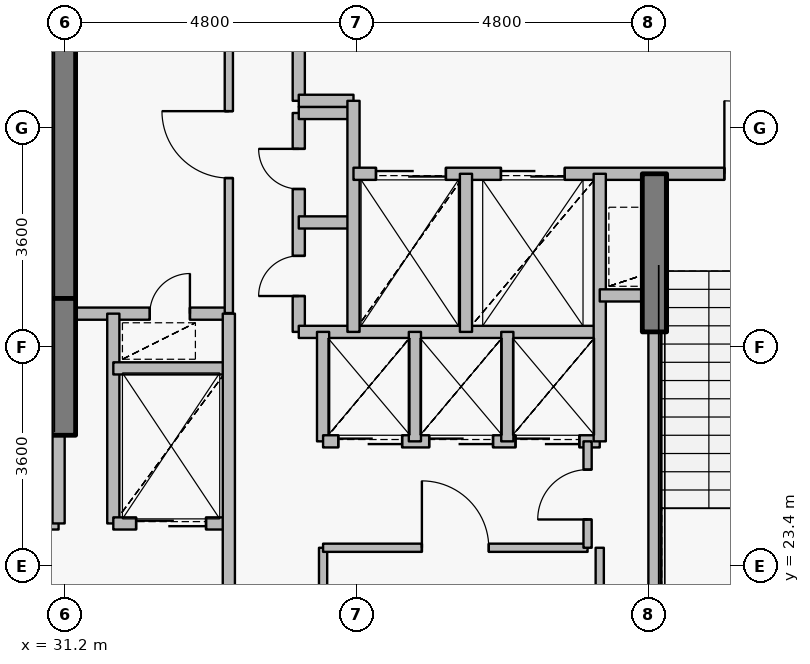
"""IFC4 building model, lengths in metres.
Left out: names, types, materials, properties, quantities, classifications, styles, units other than length and angle.
Written with IfcOpenShell. Run it as: python <this file> out.ifc"""

import sys

from ifc_helpers import new_model, si_unit, direction, frame, frame_2d, origin, origin_2d, place, context, subcontext, project, spatial, rectangle, extrude, source, transform, mapped, element, fill, save


model = new_model("IFC4")
c1 = context("Model", 3, precision=1e-05, world=origin(), true_north=direction((0.0, 1.0)))
c2 = subcontext(c1, "Body", "Model", "MODEL_VIEW")
j1 = project(units=[si_unit("LENGTHUNIT", "METRE"), si_unit("PLANEANGLEUNIT", "RADIAN")], contexts=[c1])
p1 = place(None, origin())
s1 = spatial("IfcSite", under=j1, at=p1, CompositionType="ELEMENT")
p2 = place(p1, origin())
s2 = spatial("IfcBuilding", under=s1, at=p2, CompositionType="ELEMENT")
p3 = place(p2, frame((0.0, 0.0, 359.4)))
s3 = spatial("IfcBuildingStorey", under=s2, at=p3, CompositionType="ELEMENT", Elevation=359.4)
p4 = place(p3, frame((31.18, 27.8, 0.0), z_axis=(0.0, 0.0, 1.0), x_axis=(0.0, 1.0, 0.0)))
e1 = element("IfcWall", 1, at=p4, inside=s3, PredefinedType="SHEAR", context=c2, shape_type="SweptSolid", body=[
    extrude(rectangle(XDim=4.75, YDim=0.4, at=frame_2d((2.375, 0.0))), origin(), (0.0, 0.0, 1.0), 4.2),
])
p5 = place(p3, frame((31.18, 25.55, 0.0), z_axis=(0.0, 0.0, 1.0), x_axis=(0.0, 1.0, 0.0)))
e2 = element("IfcWall", 2, at=p5, inside=s3, PredefinedType="SHEAR", context=c2, shape_type="SweptSolid", body=[
    extrude(rectangle(XDim=2.25, YDim=0.4, at=frame_2d((1.125, 0.0))), origin(), (0.0, 0.0, 1.0), 3.5),
])
p6 = place(p3, frame((40.9, 27.25, 0.0), z_axis=(0.0, 0.0, 1.0), x_axis=(0.0, 1.0, 0.0)))
e3 = element("IfcWall", 3, at=p6, inside=s3, PredefinedType="SHEAR", context=c2, shape_type="SweptSolid", body=[
    extrude(rectangle(XDim=2.6, YDim=0.4, at=frame_2d((1.3, 0.0))), origin(), (0.0, 0.0, 1.0), 3.5),
])
p7 = place(p3, frame((27.56, 24.1, 0.0), z_axis=(0.0, 0.0, 1.0), x_axis=(1.0, 0.0, 0.0)))
e4 = element("IfcWall", 4, at=p7, inside=s3, PredefinedType="PARTITIONING", context=c2, shape_type="SweptSolid", body=[
    extrude(rectangle(XDim=3.54, YDim=0.2, at=frame_2d((1.77, 0.0))), origin(), (0.0, 0.0, 1.0), 3.9),
])
p8 = place(p7, frame((1.17, 0.0, 0.0)))
e5 = element("IfcOpeningElement", 5, at=p8, cuts=e4, PredefinedType="OPENING", context=c2, shape_type="SweptSolid", body=[
    extrude(rectangle(XDim=1.2, YDim=2.15, at=origin_2d()), frame((0.6, 0.11, 1.075), z_axis=(0.0, -1.0, 0.0), x_axis=(1.0, 0.0, 0.0)), (0.0, 0.0, 1.0), 0.22),
])
p9 = place(p3, frame((31.1, 24.1, 0.0), z_axis=(0.0, 0.0, 1.0), x_axis=(0.0, 1.0, 0.0)))
e6 = element("IfcWall", 6, at=p9, inside=s3, PredefinedType="PARTITIONING", context=c2, shape_type="SweptSolid", body=[
    extrude(rectangle(XDim=1.44, YDim=0.2, at=frame_2d((0.72, 0.0))), origin(), (0.0, 0.0, 1.0), 3.9),
])
p10 = place(p3, frame((31.1, 27.55, 0.0), z_axis=(0.0, 0.0, 1.0), x_axis=(1.0, 0.0, 0.0)))
e7 = element("IfcWall", 7, at=p10, inside=s3, PredefinedType="PARTITIONING", context=c2, shape_type="SweptSolid", body=[
    extrude(rectangle(XDim=2.8, YDim=0.2, at=frame_2d((1.4, 0.0))), origin(), (0.0, 0.0, 1.0), 3.485),
])
p11 = place(p10, frame((1.5, 0.0, 0.0)))
e8 = element("IfcOpeningElement", 8, at=p11, cuts=e7, PredefinedType="OPENING", context=c2, shape_type="SweptSolid", body=[
    extrude(rectangle(XDim=0.66, YDim=2.05, at=origin_2d()), frame((0.33, 0.11, 1.025), z_axis=(0.0, -1.0, 0.0), x_axis=(1.0, 0.0, 0.0)), (0.0, 0.0, 1.0), 0.22),
])
p12 = place(p3, frame((32.0, 24.1, 0.0), z_axis=(0.0, 0.0, 1.0), x_axis=(0.0, 1.0, 0.0)))
e9 = element("IfcWall", 9, at=p12, inside=s3, PredefinedType="PARTITIONING", context=c2, shape_type="SweptSolid", body=[
    extrude(rectangle(XDim=3.45, YDim=0.2, at=frame_2d((1.725, 0.0))), origin(), (0.0, 0.0, 1.0), 3.9),
])
p13 = place(p3, frame((32.0, 24.1, 0.0), z_axis=(0.0, 0.0, 1.0), x_axis=(1.0, 0.0, 0.0)))
e10 = element("IfcWall", 10, at=p13, inside=s3, PredefinedType="PARTITIONING", context=c2, shape_type="SweptSolid", body=[
    extrude(rectangle(XDim=1.9, YDim=0.2, at=frame_2d((0.95, 0.0))), origin(), (0.0, 0.0, 1.0), 3.485),
])
p14 = place(p13, frame((0.375, 0.0, 0.0)))
e11 = element("IfcOpeningElement", 11, at=p14, cuts=e10, PredefinedType="OPENING", context=c2, shape_type="SweptSolid", body=[
    extrude(rectangle(XDim=1.15, YDim=2.15, at=origin_2d()), frame((0.575, 0.11, 1.075), z_axis=(0.0, -1.0, 0.0), x_axis=(1.0, 0.0, 0.0)), (0.0, 0.0, 1.0), 0.22),
])
p15 = place(p3, frame((32.0, 26.65, 0.0), z_axis=(0.0, 0.0, 1.0), x_axis=(1.0, 0.0, 0.0)))
e12 = element("IfcWall", 12, at=p15, inside=s3, PredefinedType="PARTITIONING", context=c2, shape_type="SweptSolid", body=[
    extrude(rectangle(XDim=1.9, YDim=0.2, at=frame_2d((0.95, 0.0))), origin(), (0.0, 0.0, 1.0), 3.485),
])
p16 = place(p3, frame((33.9, 20.9, 0.0), z_axis=(0.0, 0.0, 1.0), x_axis=(0.0, 1.0, 0.0)))
e13 = element("IfcWall", 13, at=p16, inside=s3, PredefinedType="PARTITIONING", context=c2, shape_type="SweptSolid", body=[
    extrude(rectangle(XDim=6.65, YDim=0.2, at=frame_2d((3.325, 0.0))), origin(), (0.0, 0.0, 1.0), 3.485),
])
p17 = place(p3, frame((33.9, 27.56, 0.0), z_axis=(0.0, 0.0, 1.0), x_axis=(0.0, 1.0, 0.0)))
e14 = element("IfcWall", 14, at=p17, inside=s3, PredefinedType="PARTITIONING", context=c2, shape_type="SweptSolid", body=[
    extrude(rectangle(XDim=5.54, YDim=0.135, at=frame_2d((2.77, 0.0))), origin(), (0.0, 0.0, 1.0), 3.485),
])
p18 = place(p17, frame((2.22, 0.0, 0.0)))
e15 = element("IfcOpeningElement", 15, at=p18, cuts=e14, PredefinedType="OPENING", context=c2, shape_type="SweptSolid", body=[
    extrude(rectangle(XDim=1.1, YDim=2.15, at=origin_2d()), frame((0.55, 0.078, 1.075), z_axis=(0.0, -1.0, 0.0), x_axis=(1.0, 0.0, 0.0)), (0.0, 0.0, 1.0), 0.155),
])
p19 = place(p3, frame((35.05, 27.25, 0.0), z_axis=(0.0, 0.0, 1.0), x_axis=(0.0, 1.0, 0.0)))
e16 = element("IfcWall", 16, at=p19, inside=s3, PredefinedType="PARTITIONING", context=c2, shape_type="SweptSolid", body=[
    extrude(rectangle(XDim=3.6, YDim=0.2, at=frame_2d((1.8, 0.0))), origin(), (0.0, 0.0, 1.0), 3.9),
])
p20 = place(p19, frame((0.59, 0.0, 0.0)))
e17 = element("IfcOpeningElement", 17, at=p20, cuts=e16, PredefinedType="OPENING", context=c2, shape_type="SweptSolid", body=[
    extrude(rectangle(XDim=0.66, YDim=2.05, at=origin_2d()), frame((0.33, 0.11, 1.025), z_axis=(0.0, -1.0, 0.0), x_axis=(1.0, 0.0, 0.0)), (0.0, 0.0, 1.0), 0.22),
])
p21 = place(p19, frame((2.35, 0.0, 0.0)))
e18 = element("IfcOpeningElement", 18, at=p21, cuts=e16, PredefinedType="OPENING", context=c2, shape_type="SweptSolid", body=[
    extrude(rectangle(XDim=0.66, YDim=2.05, at=origin_2d()), frame((0.33, 0.11, 1.025), z_axis=(0.0, -1.0, 0.0), x_axis=(1.0, 0.0, 0.0)), (0.0, 0.0, 1.0), 0.22),
])
p22 = place(p3, frame((35.05, 27.25, 0.0), z_axis=(0.0, 0.0, 1.0), x_axis=(1.0, 0.0, 0.0)))
e19 = element("IfcWall", 19, at=p22, inside=s3, PredefinedType="PARTITIONING", context=c2, shape_type="SweptSolid", body=[
    extrude(rectangle(XDim=4.95, YDim=0.2, at=frame_2d((2.475, 0.0))), origin(), (0.0, 0.0, 1.0), 3.485),
])
for number, where, z_axis, x_axis in (
    (20, (35.05, 29.05, 0.0), (0.0, 0.0, 1.0), (1.0, 0.0, 0.0)),
    (21, (35.05, 30.85, 0.0), (0.0, 0.0, 1.0), (1.0, 0.0, 0.0)),
):
    element("IfcWall", number, at=place(p3, frame(where, z_axis=z_axis, x_axis=x_axis)), inside=s3, PredefinedType="PARTITIONING", context=c2, shape_type="SweptSolid", body=[
        extrude(rectangle(XDim=0.9, YDim=0.2, at=frame_2d((0.45, 0.0))), origin(), (0.0, 0.0, 1.0), 3.9),
    ])
p23 = place(p3, frame((35.05, 31.05, 0.0), z_axis=(0.0, 0.0, 1.0), x_axis=(0.0, 1.0, 0.0)))
e22 = element("IfcWall", 22, at=p23, inside=s3, PredefinedType="PARTITIONING", context=c2, shape_type="SweptSolid", body=[
    extrude(rectangle(XDim=2.05, YDim=0.2, at=frame_2d((1.025, 0.0))), origin(), (0.0, 0.0, 1.0), 3.485),
])
p24 = place(p3, frame((35.05, 31.05, 0.0), z_axis=(0.0, 0.0, 1.0), x_axis=(1.0, 0.0, 0.0)))
e23 = element("IfcWall", 23, at=p24, inside=s3, PredefinedType="PARTITIONING", context=c2, shape_type="SweptSolid", body=[
    extrude(rectangle(XDim=0.9, YDim=0.2, at=frame_2d((0.45, 0.0))), origin(), (0.0, 0.0, 1.0), 3.9),
])
p25 = place(p3, frame((35.45, 20.9, 0.0), z_axis=(0.0, 0.0, 1.0), x_axis=(0.0, 1.0, 0.0)))
e24 = element("IfcWall", 24, at=p25, inside=s3, PredefinedType="PARTITIONING", context=c2, shape_type="SweptSolid", body=[
    extrude(rectangle(XDim=2.8, YDim=0.135, at=frame_2d((1.4, 0.0))), origin(), (0.0, 0.0, 1.0), 3.485),
])
p26 = place(p3, frame((35.45, 23.7, 0.0), z_axis=(0.0, 0.0, 1.0), x_axis=(1.0, 0.0, 0.0)))
e25 = element("IfcWall", 25, at=p26, inside=s3, PredefinedType="PARTITIONING", context=c2, shape_type="SweptSolid", body=[
    extrude(rectangle(XDim=4.35, YDim=0.135, at=frame_2d((2.175, 0.0))), origin(), (0.0, 0.0, 1.0), 3.485),
])
p27 = place(p26, frame((1.625, 0.0, 0.0)))
e26 = element("IfcOpeningElement", 26, at=p27, cuts=e25, PredefinedType="OPENING", context=c2, shape_type="SweptSolid", body=[
    extrude(rectangle(XDim=1.1, YDim=2.15, at=origin_2d()), frame((0.55, 0.078, 1.075), z_axis=(0.0, -1.0, 0.0), x_axis=(1.0, 0.0, 0.0)), (0.0, 0.0, 1.0), 0.155),
])
p28 = place(p3, frame((35.45, 25.45, 0.0), z_axis=(0.0, 0.0, 1.0), x_axis=(0.0, 1.0, 0.0)))
e27 = element("IfcWall", 27, at=p28, inside=s3, PredefinedType="PARTITIONING", context=c2, shape_type="SweptSolid", body=[
    extrude(rectangle(XDim=1.8, YDim=0.2, at=frame_2d((0.9, 0.0))), origin(), (0.0, 0.0, 1.0), 3.9),
])
p29 = place(p3, frame((35.45, 25.45, 0.0), z_axis=(0.0, 0.0, 1.0), x_axis=(1.0, 0.0, 0.0)))
e28 = element("IfcWall", 28, at=p29, inside=s3, PredefinedType="PARTITIONING", context=c2, shape_type="SweptSolid", body=[
    extrude(rectangle(XDim=4.55, YDim=0.2, at=frame_2d((2.275, 0.0))), origin(), (0.0, 0.0, 1.0), 3.485),
])
p30 = place(p29, frame((0.25, 0.0, 0.0)))
e29 = element("IfcOpeningElement", 29, at=p30, cuts=e28, PredefinedType="OPENING", context=c2, shape_type="SweptSolid", body=[
    extrude(rectangle(XDim=1.05, YDim=2.15, at=origin_2d()), frame((0.525, 0.11, 1.075), z_axis=(0.0, -1.0, 0.0), x_axis=(1.0, 0.0, 0.0)), (0.0, 0.0, 1.0), 0.22),
])
p31 = place(p29, frame((1.745, 0.0, 0.0)))
e30 = element("IfcOpeningElement", 30, at=p31, cuts=e28, PredefinedType="OPENING", context=c2, shape_type="SweptSolid", body=[
    extrude(rectangle(XDim=1.05, YDim=2.15, at=origin_2d()), frame((0.525, 0.11, 1.075), z_axis=(0.0, -1.0, 0.0), x_axis=(1.0, 0.0, 0.0)), (0.0, 0.0, 1.0), 0.22),
])
p32 = place(p29, frame((3.165, 0.0, 0.0)))
e31 = element("IfcOpeningElement", 31, at=p32, cuts=e28, PredefinedType="OPENING", context=c2, shape_type="SweptSolid", body=[
    extrude(rectangle(XDim=1.05, YDim=2.15, at=origin_2d()), frame((0.525, 0.11, 1.075), z_axis=(0.0, -1.0, 0.0), x_axis=(1.0, 0.0, 0.0)), (0.0, 0.0, 1.0), 0.22),
])
p33 = place(p3, frame((35.95, 27.25, 0.0), z_axis=(0.0, 0.0, 1.0), x_axis=(0.0, 1.0, 0.0)))
e32 = element("IfcWall", 32, at=p33, inside=s3, PredefinedType="PARTITIONING", context=c2, shape_type="SweptSolid", body=[
    extrude(rectangle(XDim=3.8, YDim=0.2, at=frame_2d((1.9, 0.0))), origin(), (0.0, 0.0, 1.0), 3.9),
])
p34 = place(p3, frame((35.95, 29.85, 0.0), z_axis=(0.0, 0.0, 1.0), x_axis=(1.0, 0.0, 0.0)))
e33 = element("IfcWall", 33, at=p34, inside=s3, PredefinedType="PARTITIONING", context=c2, shape_type="SweptSolid", body=[
    extrude(rectangle(XDim=8.49, YDim=0.2, at=frame_2d((4.245, 0.0))), origin(), (0.0, 0.0, 1.0), 3.485),
])
p35 = place(p34, frame((6.1, 0.0, 0.0)))
e34 = element("IfcOpeningElement", 34, at=p35, cuts=e33, PredefinedType="OPENING", context=c2, shape_type="SweptSolid", body=[
    extrude(rectangle(XDim=1.2, YDim=2.15, at=origin_2d()), frame((0.6, 0.11, 1.075), z_axis=(0.0, -1.0, 0.0), x_axis=(1.0, 0.0, 0.0)), (0.0, 0.0, 1.0), 0.22),
])
p36 = place(p34, frame((0.37, 0.0, 0.0)))
e35 = element("IfcOpeningElement", 35, at=p36, cuts=e33, PredefinedType="OPENING", context=c2, shape_type="SweptSolid", body=[
    extrude(rectangle(XDim=1.15, YDim=2.15, at=origin_2d()), frame((0.575, 0.11, 1.075), z_axis=(0.0, -1.0, 0.0), x_axis=(1.0, 0.0, 0.0)), (0.0, 0.0, 1.0), 0.22),
])
p37 = place(p34, frame((2.425, 0.0, 0.0)))
e36 = element("IfcOpeningElement", 36, at=p37, cuts=e33, PredefinedType="OPENING", context=c2, shape_type="SweptSolid", body=[
    extrude(rectangle(XDim=1.05, YDim=2.15, at=origin_2d()), frame((0.525, 0.11, 1.075), z_axis=(0.0, -1.0, 0.0), x_axis=(1.0, 0.0, 0.0)), (0.0, 0.0, 1.0), 0.22),
])
p38 = place(p3, frame((36.96, 25.45, 0.0), z_axis=(0.0, 0.0, 1.0), x_axis=(0.0, 1.0, 0.0)))
e37 = element("IfcWall", 37, at=p38, inside=s3, PredefinedType="PARTITIONING", context=c2, shape_type="SweptSolid", body=[
    extrude(rectangle(XDim=1.8, YDim=0.2, at=frame_2d((0.9, 0.0))), origin(), (0.0, 0.0, 1.0), 3.9),
])
p39 = place(p3, frame((37.8, 27.25, 0.0), z_axis=(0.0, 0.0, 1.0), x_axis=(0.0, 1.0, 0.0)))
e38 = element("IfcWall", 38, at=p39, inside=s3, PredefinedType="PARTITIONING", context=c2, shape_type="SweptSolid", body=[
    extrude(rectangle(XDim=2.6, YDim=0.2, at=frame_2d((1.3, 0.0))), origin(), (0.0, 0.0, 1.0), 3.9),
])
p40 = place(p3, frame((38.48, 25.45, 0.0), z_axis=(0.0, 0.0, 1.0), x_axis=(0.0, 1.0, 0.0)))
e39 = element("IfcWall", 39, at=p40, inside=s3, PredefinedType="PARTITIONING", context=c2, shape_type="SweptSolid", body=[
    extrude(rectangle(XDim=1.8, YDim=0.2, at=frame_2d((0.9, 0.0))), origin(), (0.0, 0.0, 1.0), 3.9),
])
p41 = place(p3, frame((39.8, 23.7, 0.0), z_axis=(0.0, 0.0, 1.0), x_axis=(0.0, 1.0, 0.0)))
e40 = element("IfcWall", 40, at=p41, inside=s3, PredefinedType="PARTITIONING", context=c2, shape_type="SweptSolid", body=[
    extrude(rectangle(XDim=1.75, YDim=0.135, at=frame_2d((0.875, 0.0))), origin(), (0.0, 0.0, 1.0), 3.9),
])
p42 = place(p41, frame((0.465, 0.0, 0.0)))
e41 = element("IfcOpeningElement", 41, at=p42, cuts=e40, PredefinedType="OPENING", context=c2, shape_type="SweptSolid", body=[
    extrude(rectangle(XDim=0.82, YDim=2.1, at=origin_2d()), frame((0.41, 0.078, 1.05), z_axis=(0.0, -1.0, 0.0), x_axis=(1.0, 0.0, 0.0)), (0.0, 0.0, 1.0), 0.155),
])
p43 = place(p3, frame((40.0, 25.45, 0.0), z_axis=(0.0, 0.0, 1.0), x_axis=(0.0, 1.0, 0.0)))
e42 = element("IfcWall", 42, at=p43, inside=s3, PredefinedType="PARTITIONING", context=c2, shape_type="SweptSolid", body=[
    extrude(rectangle(XDim=4.4, YDim=0.2, at=frame_2d((2.2, 0.0))), origin(), (0.0, 0.0, 1.0), 3.9),
])
p44 = place(p3, frame((40.0, 27.85, 0.0), z_axis=(0.0, 0.0, 1.0), x_axis=(1.0, 0.0, 0.0)))
e43 = element("IfcWall", 43, at=p44, inside=s3, PredefinedType="PARTITIONING", context=c2, shape_type="SweptSolid", body=[
    extrude(rectangle(XDim=0.9, YDim=0.2, at=frame_2d((0.45, 0.0))), origin(), (0.0, 0.0, 1.0), 3.9),
])
p45 = place(p3, frame((40.9, 21.33, 0.0), z_axis=(0.0, 0.0, 1.0), x_axis=(0.0, 1.0, 0.0)))
e44 = element("IfcWall", 44, at=p45, inside=s3, PredefinedType="PARTITIONING", context=c2, shape_type="SweptSolid", body=[
    extrude(rectangle(XDim=5.91, YDim=0.2, at=frame_2d((2.955, 0.0))), origin(), (0.0, 0.0, 1.0), 3.435),
])
p46 = place(p3, frame((40.0, 23.7, 0.0), z_axis=(0.0, 0.0, 1.0), x_axis=(0.0, -1.0, 0.0)))
e45 = element("IfcWall", 45, at=p46, inside=s3, PredefinedType="PARTITIONING", context=c2, shape_type="SweptSolid", body=[
    extrude(rectangle(XDim=2.54, YDim=0.135, at=frame_2d((1.27, 0.0))), origin(), (0.0, 0.0, 1.0), 3.435),
])
m1 = source(origin(), c2, "Body", "SweptSolid", [
    extrude(rectangle(XDim=1.2, YDim=2.15, at=origin_2d()), frame((0.6, 0.025, 1.075), z_axis=(0.0, -1.0, 0.0), x_axis=(1.0, 0.0, 0.0)), (0.0, 0.0, 1.0), 0.05),
])
p47 = place(p35, origin())
e46 = element("IfcDoor", 46, at=p47, inside=s3, OperationType="SINGLE_SWING_LEFT", PredefinedType="DOOR", context=c2, shape_type="MappedRepresentation", body=[
    mapped(m1, transform((0.0, 0.0, 0.0), x_axis=(1.0, 0.0, 0.0), y_axis=(0.0, 1.0, 0.0), z_axis=(0.0, 0.0, 1.0), scale=1.0)),
])
fill(e34, e46)
m2 = source(origin(), c2, "Body", "SweptSolid", [
    extrude(rectangle(XDim=1.15, YDim=2.15, at=origin_2d()), frame((0.575, 0.025, 1.075), z_axis=(0.0, -1.0, 0.0), x_axis=(1.0, 0.0, 0.0)), (0.0, 0.0, 1.0), 0.05),
])
p48 = place(p36, origin())
e47 = element("IfcDoor", 47, at=p48, inside=s3, OperationType="DOUBLE_DOOR_SLIDING", PredefinedType="USERDEFINED", context=c2, shape_type="MappedRepresentation", body=[
    mapped(m2, transform((0.0, 0.0, 0.0), x_axis=(1.0, 0.0, 0.0), y_axis=(0.0, 1.0, 0.0), z_axis=(0.0, 0.0, 1.0), scale=1.0)),
])
fill(e35, e47)
p49 = place(p14, origin())
e48 = element("IfcDoor", 48, at=p49, inside=s3, OperationType="DOUBLE_DOOR_SLIDING", PredefinedType="USERDEFINED", context=c2, shape_type="MappedRepresentation", body=[
    mapped(m2, transform((0.0, 0.0, 0.0), x_axis=(1.0, 0.0, 0.0), y_axis=(0.0, 1.0, 0.0), z_axis=(0.0, 0.0, 1.0), scale=1.0)),
])
fill(e11, e48)
m3 = source(origin(), c2, "Body", "SweptSolid", [
    extrude(rectangle(XDim=1.05, YDim=2.15, at=origin_2d()), frame((0.525, 0.025, 1.075), z_axis=(0.0, -1.0, 0.0), x_axis=(1.0, 0.0, 0.0)), (0.0, 0.0, 1.0), 0.05),
])
p50 = place(p37, origin())
e49 = element("IfcDoor", 49, at=p50, inside=s3, OperationType="DOUBLE_DOOR_SLIDING", PredefinedType="USERDEFINED", context=c2, shape_type="MappedRepresentation", body=[
    mapped(m3, transform((0.0, 0.0, 0.0), x_axis=(1.0, 0.0, 0.0), y_axis=(0.0, 1.0, 0.0), z_axis=(0.0, 0.0, 1.0), scale=1.0)),
])
fill(e36, e49)
p51 = place(p30, origin())
e50 = element("IfcDoor", 50, at=p51, inside=s3, OperationType="DOUBLE_DOOR_SLIDING", PredefinedType="USERDEFINED", context=c2, shape_type="MappedRepresentation", body=[
    mapped(m3, transform((0.0, 0.0, 0.0), x_axis=(1.0, 0.0, 0.0), y_axis=(0.0, 1.0, 0.0), z_axis=(0.0, 0.0, 1.0), scale=1.0)),
])
fill(e29, e50)
p52 = place(p31, origin())
e51 = element("IfcDoor", 51, at=p52, inside=s3, OperationType="DOUBLE_DOOR_SLIDING", PredefinedType="USERDEFINED", context=c2, shape_type="MappedRepresentation", body=[
    mapped(m3, transform((0.0, 0.0, 0.0), x_axis=(1.0, 0.0, 0.0), y_axis=(0.0, 1.0, 0.0), z_axis=(0.0, 0.0, 1.0), scale=1.0)),
])
fill(e30, e51)
p53 = place(p32, origin())
e52 = element("IfcDoor", 52, at=p53, inside=s3, OperationType="DOUBLE_DOOR_SLIDING", PredefinedType="USERDEFINED", context=c2, shape_type="MappedRepresentation", body=[
    mapped(m3, transform((0.0, 0.0, 0.0), x_axis=(1.0, 0.0, 0.0), y_axis=(0.0, 1.0, 0.0), z_axis=(0.0, 0.0, 1.0), scale=1.0)),
])
fill(e31, e52)
m4 = source(origin(), c2, "Body", "SweptSolid", [
    extrude(rectangle(XDim=0.66, YDim=2.05, at=origin_2d()), frame((0.33, 0.025, 1.025), z_axis=(0.0, -1.0, 0.0), x_axis=(1.0, 0.0, 0.0)), (0.0, 0.0, 1.0), 0.05),
])
p54 = place(p20, origin())
e53 = element("IfcDoor", 53, at=p54, inside=s3, OperationType="SINGLE_SWING_LEFT", PredefinedType="USERDEFINED", context=c2, shape_type="MappedRepresentation", body=[
    mapped(m4, transform((0.0, 0.0, 0.0), x_axis=(1.0, 0.0, 0.0), y_axis=(0.0, 1.0, 0.0), z_axis=(0.0, 0.0, 1.0), scale=1.0)),
])
fill(e17, e53)
p55 = place(p21, origin())
e54 = element("IfcDoor", 54, at=p55, inside=s3, OperationType="SINGLE_SWING_RIGHT", PredefinedType="USERDEFINED", context=c2, shape_type="MappedRepresentation", body=[
    mapped(m4, transform((0.0, 0.0, 0.0), x_axis=(1.0, 0.0, 0.0), y_axis=(0.0, 1.0, 0.0), z_axis=(0.0, 0.0, 1.0), scale=1.0)),
])
fill(e18, e54)
m5 = source(origin(), c2, "Body", "SweptSolid", [
    extrude(rectangle(XDim=1.1, YDim=2.15, at=origin_2d()), frame((0.55, 0.025, 1.075), z_axis=(0.0, -1.0, 0.0), x_axis=(1.0, 0.0, 0.0)), (0.0, 0.0, 1.0), 0.05),
])
p56 = place(p27, origin())
e55 = element("IfcDoor", 55, at=p56, inside=s3, OperationType="SINGLE_SWING_LEFT", PredefinedType="DOOR", context=c2, shape_type="MappedRepresentation", body=[
    mapped(m5, transform((0.0, 0.0, 0.0), x_axis=(1.0, 0.0, 0.0), y_axis=(0.0, 1.0, 0.0), z_axis=(0.0, 0.0, 1.0), scale=1.0)),
])
fill(e26, e55)
p57 = place(p18, origin())
e56 = element("IfcDoor", 56, at=p57, inside=s3, OperationType="SINGLE_SWING_RIGHT", PredefinedType="DOOR", context=c2, shape_type="MappedRepresentation", body=[
    mapped(m5, transform((0.0, 0.0, 0.0), x_axis=(1.0, 0.0, 0.0), y_axis=(0.0, 1.0, 0.0), z_axis=(0.0, 0.0, 1.0), scale=1.0)),
])
fill(e15, e56)
m6 = source(origin(), c2, "Body", "SweptSolid", [
    extrude(rectangle(XDim=0.82, YDim=2.1, at=origin_2d()), frame((0.41, 0.025, 1.05), z_axis=(0.0, -1.0, 0.0), x_axis=(1.0, 0.0, 0.0)), (0.0, 0.0, 1.0), 0.05),
])
p58 = place(p42, origin())
e57 = element("IfcDoor", 57, at=p58, inside=s3, OperationType="SINGLE_SWING_LEFT", PredefinedType="DOOR", context=c2, shape_type="MappedRepresentation", body=[
    mapped(m6, transform((0.0, 0.0, 0.0), x_axis=(1.0, 0.0, 0.0), y_axis=(0.0, 1.0, 0.0), z_axis=(0.0, 0.0, 1.0), scale=1.0)),
])
fill(e41, e57)
p59 = place(p11, origin())
e58 = element("IfcDoor", 58, at=p59, inside=s3, OperationType="SINGLE_SWING_RIGHT", PredefinedType="USERDEFINED", context=c2, shape_type="MappedRepresentation", body=[
    mapped(m4, transform((0.0, 0.0, 0.0), x_axis=(1.0, 0.0, 0.0), y_axis=(0.0, 1.0, 0.0), z_axis=(0.0, 0.0, 1.0), scale=1.0)),
])
fill(e8, e58)
save(model, sys.argv[1])
